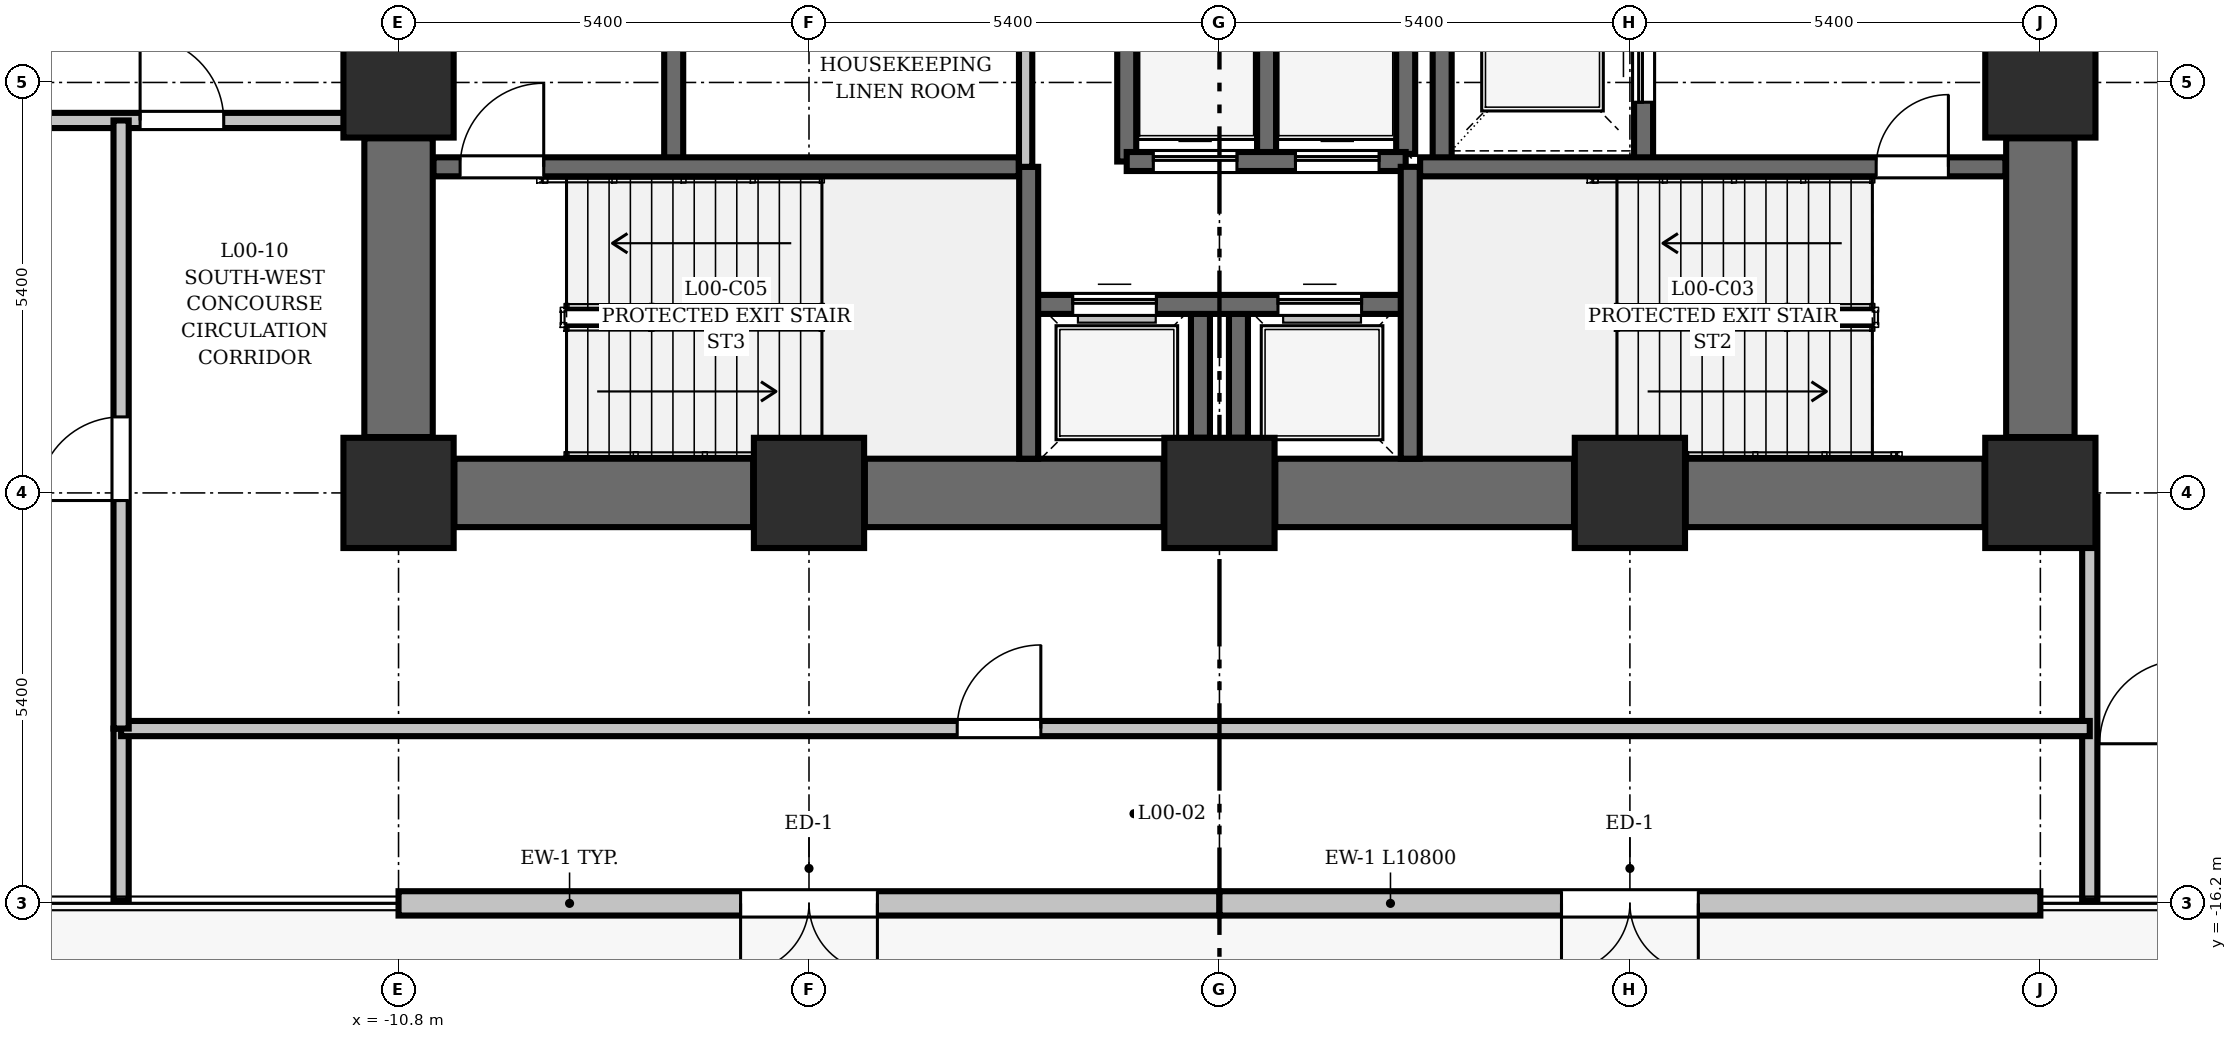
"""IFC4 building model, lengths in metres.
Left out: names, types, materials, properties, quantities, classifications, styles, units other than length and angle.
Written with IfcOpenShell. Run it as: python <this file> out.ifc"""

import sys

from ifc_helpers import new_model, si_unit, direction, frame, frame_2d, origin, origin_2d, place, context, subcontext, project, spatial, rectangle, extrude, element, fill, save


model = new_model("IFC4")
c1 = context("Model", 3, precision=1e-05, world=origin(), true_north=direction((0.0, 1.0)))
c2 = subcontext(c1, "Body", "Model", "MODEL_VIEW")
j1 = project(units=[si_unit("LENGTHUNIT", "METRE"), si_unit("PLANEANGLEUNIT", "RADIAN")], contexts=[c1])
p1 = place(None, origin())
s1 = spatial("IfcSite", under=j1, at=p1, CompositionType="ELEMENT")
p2 = place(p1, origin())
s2 = spatial("IfcBuilding", under=s1, at=p2, CompositionType="ELEMENT")
p3 = place(p2, origin())
s3 = spatial("IfcBuildingStorey", under=s2, at=p3, CompositionType="ELEMENT", Elevation=0.0)
for number, where, z_axis, x_axis in (
    (1, (-10.8, -10.8, 0.0), (0.0, 0.0, 1.0), (1.0, 0.0, 0.0)),
    (2, (-10.8, -5.4, 0.0), (0.0, 0.0, 1.0), (1.0, 0.0, 0.0)),
    (3, (-5.4, -10.8, 0.0), (0.0, 0.0, 1.0), (1.0, 0.0, 0.0)),
    (4, (0.0, -10.8, 0.0), (0.0, 0.0, 1.0), (1.0, 0.0, 0.0)),
    (5, (5.4, -10.8, 0.0), (0.0, 0.0, 1.0), (1.0, 0.0, 0.0)),
    (6, (10.8, -10.8, 0.0), (0.0, 0.0, 1.0), (1.0, 0.0, 0.0)),
    (7, (10.8, -5.4, 0.0), (0.0, 0.0, 1.0), (1.0, 0.0, 0.0)),
):
    element("IfcColumn", number, at=place(p3, frame(where, z_axis=z_axis, x_axis=x_axis)), inside=s3, PredefinedType="COLUMN", context=c2, shape_type="SweptSolid", body=[
        extrude(rectangle(XDim=1.45, YDim=1.45, at=origin_2d()), origin(), (0.0, 0.0, 1.0), 4.5),
    ])
for number, where, z_axis, x_axis in (
    (8, (-10.065, -10.8, 0.0), (0.0, 0.0, 1.0), (1.0, 0.0, 0.0)),
    (9, (-10.8, -10.065, 0.0), (0.0, 0.0, 1.0), (0.0, 1.0, 0.0)),
    (10, (10.8, -10.065, 0.0), (0.0, 0.0, 1.0), (0.0, 1.0, 0.0)),
    (11, (-4.665, -10.8, 0.0), (0.0, 0.0, 1.0), (1.0, 0.0, 0.0)),
    (12, (0.735, -10.8, 0.0), (0.0, 0.0, 1.0), (1.0, 0.0, 0.0)),
    (13, (6.135, -10.8, 0.0), (0.0, 0.0, 1.0), (1.0, 0.0, 0.0)),
):
    element("IfcWall", number, at=place(p3, frame(where, z_axis=z_axis, x_axis=x_axis)), inside=s3, PredefinedType="SHEAR", context=c2, shape_type="SweptSolid", body=[
        extrude(rectangle(XDim=3.93, YDim=0.9, at=frame_2d((1.965, 0.0))), origin(), (0.0, 0.0, 1.0), 4.5),
    ])
p4 = place(p3, frame((0.0, -16.2, 0.0), z_axis=(0.0, 0.0, 1.0), x_axis=(-1.0, 0.0, 0.0)))
e14 = element("IfcWall", 14, at=p4, inside=s3, PredefinedType="STANDARD", context=c2, shape_type="SweptSolid", body=[
    extrude(rectangle(XDim=10.8, YDim=0.32, at=frame_2d((5.4, 0.0))), origin(), (0.0, 0.0, 1.0), 3.329),
])
p5 = place(p4, frame((4.5, 0.0, 0.0)))
e15 = element("IfcOpeningElement", 15, at=p5, cuts=e14, PredefinedType="OPENING", context=c2, shape_type="SweptSolid", body=[
    extrude(rectangle(XDim=1.8, YDim=2.35, at=frame_2d((0.9, 1.175))), frame((0.0, 0.17, 0.0), z_axis=(0.0, -1.0, 0.0), x_axis=(1.0, 0.0, 0.0)), (0.0, 0.0, 1.0), 0.34),
])
p6 = place(p3, frame((10.8, -16.2, 0.0), z_axis=(0.0, 0.0, 1.0), x_axis=(-1.0, 0.0, 0.0)))
e16 = element("IfcWall", 16, at=p6, inside=s3, PredefinedType="STANDARD", context=c2, shape_type="SweptSolid", body=[
    extrude(rectangle(XDim=10.8, YDim=0.32, at=frame_2d((5.4, 0.0))), origin(), (0.0, 0.0, 1.0), 3.329),
])
p7 = place(p6, frame((4.5, 0.0, 0.0)))
e17 = element("IfcOpeningElement", 17, at=p7, cuts=e16, PredefinedType="OPENING", context=c2, shape_type="SweptSolid", body=[
    extrude(rectangle(XDim=1.8, YDim=2.35, at=frame_2d((0.9, 1.175))), frame((0.0, 0.17, 0.0), z_axis=(0.0, -1.0, 0.0), x_axis=(1.0, 0.0, 0.0)), (0.0, 0.0, 1.0), 0.34),
])
p8 = place(p3, frame((2.93, -6.51, 0.0), z_axis=(0.0, 0.0, 1.0), x_axis=(0.0, 1.0, 0.0)))
e18 = element("IfcWall", 18, at=p8, inside=s3, PredefinedType="SHEAR", context=c2, shape_type="SweptSolid", body=[
    extrude(rectangle(XDim=2.79, YDim=0.25, at=frame_2d((1.395, 0.0))), origin(), (0.0, 0.0, 1.0), 4.5),
])
p9 = place(p3, frame((5.58, -6.51, 0.0), z_axis=(0.0, 0.0, 1.0), x_axis=(0.0, 1.0, 0.0)))
e19 = element("IfcWall", 19, at=p9, inside=s3, PredefinedType="SHEAR", context=c2, shape_type="SweptSolid", body=[
    extrude(rectangle(XDim=5.09, YDim=0.25, at=frame_2d((2.545, 0.0))), origin(), (0.0, 0.0, 1.0), 4.5),
])
p10 = place(p9, frame((0.85, 0.0, 0.0)))
e20 = element("IfcOpeningElement", 20, at=p10, cuts=e19, PredefinedType="OPENING", context=c2, shape_type="SweptSolid", body=[
    extrude(rectangle(XDim=1.1, YDim=2.1, at=frame_2d((0.55, 1.05))), frame((0.0, 0.135, 0.0), z_axis=(0.0, -1.0, 0.0), x_axis=(1.0, 0.0, 0.0)), (0.0, 0.0, 1.0), 0.27),
])
for number, where, z_axis, x_axis in (
    (21, (0.62, -6.34, 0.0), (0.0, 0.0, 1.0), (0.0, 1.0, 0.0)),
    (22, (2.45, -6.34, 0.0), (0.0, 0.0, 1.0), (0.0, 1.0, 0.0)),
):
    element("IfcWall", number, at=place(p3, frame(where, z_axis=z_axis, x_axis=x_axis)), inside=s3, PredefinedType="SHEAR", context=c2, shape_type="SweptSolid", body=[
        extrude(rectangle(XDim=1.88, YDim=0.25, at=frame_2d((0.94, 0.0))), origin(), (0.0, 0.0, 1.0), 4.5),
    ])
for number, where, z_axis, x_axis in (
    (23, (-0.25, -10.075, 0.0), (0.0, 0.0, 1.0), (0.0, 1.0, 0.0)),
    (24, (0.25, -10.075, 0.0), (0.0, 0.0, 1.0), (0.0, 1.0, 0.0)),
):
    element("IfcWall", number, at=place(p3, frame(where, z_axis=z_axis, x_axis=x_axis)), inside=s3, PredefinedType="SHEAR", context=c2, shape_type="SweptSolid", body=[
        extrude(rectangle(XDim=1.635, YDim=0.25, at=frame_2d((0.817, 0.0))), origin(), (0.0, 0.0, 1.0), 4.5),
    ])
p11 = place(p3, frame((-1.22, -6.44, 0.0), z_axis=(0.0, 0.0, 1.0), x_axis=(0.0, 1.0, 0.0)))
e25 = element("IfcWall", 25, at=p11, inside=s3, PredefinedType="SHEAR", context=c2, shape_type="SweptSolid", body=[
    extrude(rectangle(XDim=2.08, YDim=0.25, at=frame_2d((1.04, 0.0))), origin(), (0.0, 0.0, 1.0), 4.5),
])
p12 = place(p3, frame((-1.22, -6.44, 0.0), z_axis=(0.0, 0.0, 1.0), x_axis=(1.0, 0.0, 0.0)))
e26 = element("IfcWall", 26, at=p12, inside=s3, PredefinedType="SHEAR", context=c2, shape_type="SweptSolid", body=[
    extrude(rectangle(XDim=3.67, YDim=0.25, at=frame_2d((1.835, 0.0))), origin(), (0.0, 0.0, 1.0), 4.5),
])
p13 = place(p12, frame((0.35, 0.0, 0.0)))
e27 = element("IfcOpeningElement", 27, at=p13, cuts=e26, PredefinedType="OPENING", context=c2, shape_type="SweptSolid", body=[
    extrude(rectangle(XDim=1.1, YDim=2.1, at=frame_2d((0.55, 1.05))), frame((0.0, 0.135, 0.0), z_axis=(0.0, -1.0, 0.0), x_axis=(1.0, 0.0, 0.0)), (0.0, 0.0, 1.0), 0.27),
])
p14 = place(p12, frame((2.22, 0.0, 0.0)))
e28 = element("IfcOpeningElement", 28, at=p14, cuts=e26, PredefinedType="OPENING", context=c2, shape_type="SweptSolid", body=[
    extrude(rectangle(XDim=1.1, YDim=2.1, at=frame_2d((0.55, 1.05))), frame((0.0, 0.135, 0.0), z_axis=(0.0, -1.0, 0.0), x_axis=(1.0, 0.0, 0.0)), (0.0, 0.0, 1.0), 0.27),
])
p15 = place(p3, frame((-2.48, -8.32, 0.0), z_axis=(0.0, 0.0, 1.0), x_axis=(1.0, 0.0, 0.0)))
e29 = element("IfcWall", 29, at=p15, inside=s3, PredefinedType="SHEAR", context=c2, shape_type="SweptSolid", body=[
    extrude(rectangle(XDim=4.93, YDim=0.25, at=frame_2d((2.465, 0.0))), origin(), (0.0, 0.0, 1.0), 4.5),
])
p16 = place(p15, frame((0.55, 0.0, 0.0)))
e30 = element("IfcOpeningElement", 30, at=p16, cuts=e29, PredefinedType="OPENING", context=c2, shape_type="SweptSolid", body=[
    extrude(rectangle(XDim=1.1, YDim=2.1, at=frame_2d((0.55, 1.05))), frame((0.0, 0.135, 0.0), z_axis=(0.0, -1.0, 0.0), x_axis=(1.0, 0.0, 0.0)), (0.0, 0.0, 1.0), 0.27),
])
p17 = place(p15, frame((3.25, 0.0, 0.0)))
e31 = element("IfcOpeningElement", 31, at=p17, cuts=e29, PredefinedType="OPENING", context=c2, shape_type="SweptSolid", body=[
    extrude(rectangle(XDim=1.1, YDim=2.1, at=frame_2d((0.55, 1.05))), frame((0.0, 0.135, 0.0), z_axis=(0.0, -1.0, 0.0), x_axis=(1.0, 0.0, 0.0)), (0.0, 0.0, 1.0), 0.27),
])
p18 = place(p3, frame((2.64, -6.51, 0.0), z_axis=(0.0, 0.0, 1.0), x_axis=(1.0, 0.0, 0.0)))
e32 = element("IfcWall", 32, at=p18, inside=s3, PredefinedType="SHEAR", context=c2, shape_type="SweptSolid", body=[
    extrude(rectangle(XDim=7.7, YDim=0.25, at=frame_2d((3.85, 0.0))), origin(), (0.0, 0.0, 1.0), 4.5),
])
p19 = place(p18, frame((6.0, 0.0, 0.0)))
e33 = element("IfcOpeningElement", 33, at=p19, cuts=e32, PredefinedType="OPENING", context=c2, shape_type="SweptSolid", body=[
    extrude(rectangle(XDim=0.95, YDim=2.1, at=frame_2d((0.475, 1.05))), frame((0.0, 0.135, 0.0), z_axis=(0.0, -1.0, 0.0), x_axis=(1.0, 0.0, 0.0)), (0.0, 0.0, 1.0), 0.27),
])
for number, where, z_axis, x_axis in (
    (34, (2.51, -10.35, 0.0), (0.0, 0.0, 1.0), (0.0, 1.0, 0.0)),
    (35, (-2.51, -10.35, 0.0), (0.0, 0.0, 1.0), (0.0, 1.0, 0.0)),
):
    element("IfcWall", number, at=place(p3, frame(where, z_axis=z_axis, x_axis=x_axis)), inside=s3, PredefinedType="SHEAR", context=c2, shape_type="SweptSolid", body=[
        extrude(rectangle(XDim=3.84, YDim=0.25, at=frame_2d((1.92, 0.0))), origin(), (0.0, 0.0, 1.0), 4.5),
    ])
p20 = place(p3, frame((-7.18, -6.51, 0.0), z_axis=(0.0, 0.0, 1.0), x_axis=(0.0, 1.0, 0.0)))
e36 = element("IfcWall", 36, at=p20, inside=s3, PredefinedType="SHEAR", context=c2, shape_type="SweptSolid", body=[
    extrude(rectangle(XDim=5.09, YDim=0.25, at=frame_2d((2.545, 0.0))), origin(), (0.0, 0.0, 1.0), 4.5),
])
p21 = place(p3, frame((-10.34, -6.51, 0.0), z_axis=(0.0, 0.0, 1.0), x_axis=(1.0, 0.0, 0.0)))
e37 = element("IfcWall", 37, at=p21, inside=s3, PredefinedType="SHEAR", context=c2, shape_type="SweptSolid", body=[
    extrude(rectangle(XDim=7.7, YDim=0.25, at=frame_2d((3.85, 0.0))), origin(), (0.0, 0.0, 1.0), 4.5),
])
p22 = place(p21, frame((0.35, 0.0, 0.0)))
e38 = element("IfcOpeningElement", 38, at=p22, cuts=e37, PredefinedType="OPENING", context=c2, shape_type="SweptSolid", body=[
    extrude(rectangle(XDim=1.1, YDim=2.1, at=frame_2d((0.55, 1.05))), frame((0.0, 0.135, 0.0), z_axis=(0.0, -1.0, 0.0), x_axis=(1.0, 0.0, 0.0)), (0.0, 0.0, 1.0), 0.27),
])
p23 = place(p3, frame((-2.55, -6.51, 0.0), z_axis=(0.0, 0.0, 1.0), x_axis=(0.0, 1.0, 0.0)))
e39 = element("IfcWall", 39, at=p23, inside=s3, PredefinedType="PARTITIONING", context=c2, shape_type="SweptSolid", body=[
    extrude(rectangle(XDim=5.16, YDim=0.175, at=frame_2d((2.58, 0.0))), origin(), (0.0, 0.0, 1.0), 4.2),
])
p24 = place(p23, frame((3.3, 0.0, 0.0)))
e40 = element("IfcOpeningElement", 40, at=p24, cuts=e39, PredefinedType="OPENING", context=c2, shape_type="SweptSolid", body=[
    extrude(rectangle(XDim=0.85, YDim=2.1, at=frame_2d((0.425, 1.05))), frame((0.0, 0.097, 0.0), z_axis=(0.0, -1.0, 0.0), x_axis=(1.0, 0.0, 0.0)), (0.0, 0.0, 1.0), 0.195),
])
p25 = place(p3, frame((11.45, -16.16, 0.0), z_axis=(0.0, 0.0, 1.0), x_axis=(0.0, 1.0, 0.0)))
e41 = element("IfcWall", 41, at=p25, inside=s3, PredefinedType="PARTITIONING", context=c2, shape_type="SweptSolid", body=[
    extrude(rectangle(XDim=5.31, YDim=0.2, at=frame_2d((2.655, 0.0))), origin(), (0.0, 0.0, 1.0), 3.329),
])
p26 = place(p3, frame((-21.56, -5.9, 0.0), z_axis=(0.0, 0.0, 1.0), x_axis=(1.0, 0.0, 0.0)))
e42 = element("IfcWall", 42, at=p26, inside=s3, PredefinedType="PARTITIONING", context=c2, shape_type="SweptSolid", body=[
    extrude(rectangle(XDim=10.71, YDim=0.2, at=frame_2d((5.355, 0.0))), origin(), (0.0, 0.0, 1.0), 3.329),
])
p27 = place(p26, frame((7.36, 0.0, 0.0)))
e43 = element("IfcOpeningElement", 43, at=p27, cuts=e42, PredefinedType="OPENING", context=c2, shape_type="SweptSolid", body=[
    extrude(rectangle(XDim=1.1, YDim=2.1, at=frame_2d((0.55, 1.05))), frame((0.0, 0.11, 0.0), z_axis=(0.0, -1.0, 0.0), x_axis=(1.0, 0.0, 0.0)), (0.0, 0.0, 1.0), 0.22),
])
p28 = place(p3, frame((-14.45, -16.16, 0.0), z_axis=(0.0, 0.0, 1.0), x_axis=(0.0, 1.0, 0.0)))
e44 = element("IfcWall", 44, at=p28, inside=s3, PredefinedType="PARTITIONING", context=c2, shape_type="SweptSolid", body=[
    extrude(rectangle(XDim=2.26, YDim=0.2, at=frame_2d((1.13, 0.0))), origin(), (0.0, 0.0, 1.0), 4.2),
])
p29 = place(p3, frame((-14.45, -13.9, 0.0), z_axis=(0.0, 0.0, 1.0), x_axis=(1.0, 0.0, 0.0)))
e45 = element("IfcWall", 45, at=p29, inside=s3, PredefinedType="PARTITIONING", context=c2, shape_type="SweptSolid", body=[
    extrude(rectangle(XDim=25.9, YDim=0.2, at=frame_2d((12.95, 0.0))), origin(), (0.0, 0.0, 1.0), 3.329),
])
p30 = place(p29, frame((11.0, 0.0, 0.0)))
e46 = element("IfcOpeningElement", 46, at=p30, cuts=e45, PredefinedType="OPENING", context=c2, shape_type="SweptSolid", body=[
    extrude(rectangle(XDim=1.1, YDim=2.1, at=frame_2d((0.55, 1.05))), frame((0.0, 0.11, 0.0), z_axis=(0.0, -1.0, 0.0), x_axis=(1.0, 0.0, 0.0)), (0.0, 0.0, 1.0), 0.22),
])
p31 = place(p3, frame((-14.45, -13.9, 0.0), z_axis=(0.0, 0.0, 1.0), x_axis=(0.0, 1.0, 0.0)))
e47 = element("IfcWall", 47, at=p31, inside=s3, PredefinedType="PARTITIONING", context=c2, shape_type="SweptSolid", body=[
    extrude(rectangle(XDim=8.0, YDim=0.2, at=frame_2d((4.0, 0.0))), origin(), (0.0, 0.0, 1.0), 3.329),
])
p32 = place(p31, frame((3.0, 0.0, 0.0)))
e48 = element("IfcOpeningElement", 48, at=p32, cuts=e47, PredefinedType="OPENING", context=c2, shape_type="SweptSolid", body=[
    extrude(rectangle(XDim=1.1, YDim=2.1, at=frame_2d((0.55, 1.05))), frame((0.0, 0.11, 0.0), z_axis=(0.0, -1.0, 0.0), x_axis=(1.0, 0.0, 0.0)), (0.0, 0.0, 1.0), 0.22),
])
p33 = place(p5, origin())
e49 = element("IfcDoor", 49, at=p33, inside=s3, OperationType="DOUBLE_DOOR_SINGLE_SWING", PredefinedType="DOOR", context=c2, shape_type="SweptSolid", body=[
    extrude(rectangle(XDim=1.8, YDim=2.35, at=frame_2d((0.9, 1.175))), frame((0.0, 0.025, 0.0), z_axis=(0.0, -1.0, 0.0), x_axis=(1.0, 0.0, 0.0)), (0.0, 0.0, 1.0), 0.05),
])
fill(e15, e49)
p34 = place(p7, origin())
e50 = element("IfcDoor", 50, at=p34, inside=s3, OperationType="DOUBLE_DOOR_SINGLE_SWING", PredefinedType="DOOR", context=c2, shape_type="SweptSolid", body=[
    extrude(rectangle(XDim=1.8, YDim=2.35, at=frame_2d((0.9, 1.175))), frame((0.0, 0.025, 0.0), z_axis=(0.0, -1.0, 0.0), x_axis=(1.0, 0.0, 0.0)), (0.0, 0.0, 1.0), 0.05),
])
fill(e17, e50)
p35 = place(p19, origin())
e51 = element("IfcDoor", 51, at=p35, inside=s3, OperationType="SINGLE_SWING_RIGHT", PredefinedType="DOOR", context=c2, shape_type="SweptSolid", body=[
    extrude(rectangle(XDim=0.95, YDim=2.1, at=frame_2d((0.475, 1.05))), frame((0.0, 0.025, 0.0), z_axis=(0.0, -1.0, 0.0), x_axis=(1.0, 0.0, 0.0)), (0.0, 0.0, 1.0), 0.05),
])
fill(e33, e51)
p36 = place(p22, origin())
e52 = element("IfcDoor", 52, at=p36, inside=s3, OperationType="SINGLE_SWING_RIGHT", PredefinedType="DOOR", context=c2, shape_type="SweptSolid", body=[
    extrude(rectangle(XDim=1.1, YDim=2.1, at=frame_2d((0.55, 1.05))), frame((0.0, 0.025, 0.0), z_axis=(0.0, -1.0, 0.0), x_axis=(1.0, 0.0, 0.0)), (0.0, 0.0, 1.0), 0.05),
])
fill(e38, e52)
p37 = place(p10, origin())
e53 = element("IfcDoor", 53, at=p37, inside=s3, OperationType="SLIDING_TO_RIGHT", PredefinedType="DOOR", context=c2, shape_type="SweptSolid", body=[
    extrude(rectangle(XDim=1.1, YDim=2.1, at=frame_2d((0.55, 1.05))), frame((0.0, 0.025, 0.0), z_axis=(0.0, -1.0, 0.0), x_axis=(1.0, 0.0, 0.0)), (0.0, 0.0, 1.0), 0.05),
])
fill(e20, e53)
p38 = place(p13, origin())
e54 = element("IfcDoor", 54, at=p38, inside=s3, OperationType="SLIDING_TO_LEFT", PredefinedType="DOOR", context=c2, shape_type="SweptSolid", body=[
    extrude(rectangle(XDim=1.1, YDim=2.1, at=frame_2d((0.55, 1.05))), frame((0.0, 0.025, 0.0), z_axis=(0.0, -1.0, 0.0), x_axis=(1.0, 0.0, 0.0)), (0.0, 0.0, 1.0), 0.05),
])
fill(e27, e54)
p39 = place(p14, origin())
e55 = element("IfcDoor", 55, at=p39, inside=s3, OperationType="SLIDING_TO_LEFT", PredefinedType="DOOR", context=c2, shape_type="SweptSolid", body=[
    extrude(rectangle(XDim=1.1, YDim=2.1, at=frame_2d((0.55, 1.05))), frame((0.0, 0.025, 0.0), z_axis=(0.0, -1.0, 0.0), x_axis=(1.0, 0.0, 0.0)), (0.0, 0.0, 1.0), 0.05),
])
fill(e28, e55)
p40 = place(p16, origin())
e56 = element("IfcDoor", 56, at=p40, inside=s3, OperationType="SLIDING_TO_LEFT", PredefinedType="DOOR", context=c2, shape_type="SweptSolid", body=[
    extrude(rectangle(XDim=1.1, YDim=2.1, at=frame_2d((0.55, 1.05))), frame((0.0, 0.025, 0.0), z_axis=(0.0, -1.0, 0.0), x_axis=(1.0, 0.0, 0.0)), (0.0, 0.0, 1.0), 0.05),
])
fill(e30, e56)
p41 = place(p17, origin())
e57 = element("IfcDoor", 57, at=p41, inside=s3, OperationType="SLIDING_TO_LEFT", PredefinedType="DOOR", context=c2, shape_type="SweptSolid", body=[
    extrude(rectangle(XDim=1.1, YDim=2.1, at=frame_2d((0.55, 1.05))), frame((0.0, 0.025, 0.0), z_axis=(0.0, -1.0, 0.0), x_axis=(1.0, 0.0, 0.0)), (0.0, 0.0, 1.0), 0.05),
])
fill(e31, e57)
p42 = place(p27, origin())
e58 = element("IfcDoor", 58, at=p42, inside=s3, OperationType="SINGLE_SWING_LEFT", PredefinedType="DOOR", context=c2, shape_type="SweptSolid", body=[
    extrude(rectangle(XDim=1.1, YDim=2.1, at=frame_2d((0.55, 1.05))), frame((0.0, 0.025, 0.0), z_axis=(0.0, -1.0, 0.0), x_axis=(1.0, 0.0, 0.0)), (0.0, 0.0, 1.0), 0.05),
])
fill(e43, e58)
p43 = place(p30, origin())
e59 = element("IfcDoor", 59, at=p43, inside=s3, OperationType="SINGLE_SWING_RIGHT", PredefinedType="DOOR", context=c2, shape_type="SweptSolid", body=[
    extrude(rectangle(XDim=1.1, YDim=2.1, at=frame_2d((0.55, 1.05))), frame((0.0, 0.025, 0.0), z_axis=(0.0, -1.0, 0.0), x_axis=(1.0, 0.0, 0.0)), (0.0, 0.0, 1.0), 0.05),
])
fill(e46, e59)
p44 = place(p32, origin())
e60 = element("IfcDoor", 60, at=p44, inside=s3, OperationType="SINGLE_SWING_LEFT", PredefinedType="DOOR", context=c2, shape_type="SweptSolid", body=[
    extrude(rectangle(XDim=1.1, YDim=2.1, at=frame_2d((0.55, 1.05))), frame((0.0, 0.025, 0.0), z_axis=(0.0, -1.0, 0.0), x_axis=(1.0, 0.0, 0.0)), (0.0, 0.0, 1.0), 0.05),
])
fill(e48, e60)
save(model, sys.argv[1])
